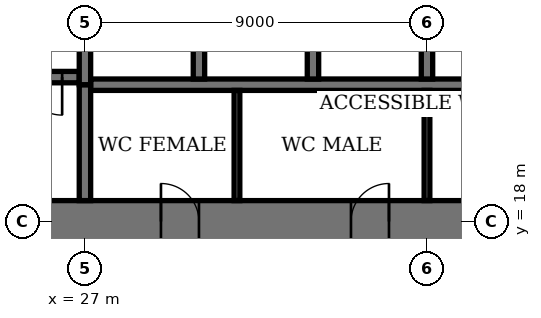
"""IFC4 building model, lengths in metres.
Left out: names, types, materials, properties, quantities, classifications, styles, units other than length and angle.
Written with IfcOpenShell. Run it as: python <this file> out.ifc"""

import sys

from ifc_helpers import new_model, si_unit, direction, frame, frame_2d, origin, place, context, subcontext, project, spatial, rectangle, extrude, element, fill, save


model = new_model("IFC4")
c1 = context("Model", 3, precision=1e-05, world=origin(), true_north=direction((0.0, 1.0)))
c2 = subcontext(c1, "Body", "Model", "MODEL_VIEW")
j1 = project(units=[si_unit("LENGTHUNIT", "METRE"), si_unit("PLANEANGLEUNIT", "RADIAN")], contexts=[c1])
p1 = place(None, origin())
s1 = spatial("IfcSite", under=j1, at=p1, CompositionType="ELEMENT")
p2 = place(p1, origin())
s2 = spatial("IfcBuilding", under=s1, at=p2, CompositionType="ELEMENT")
p3 = place(p2, frame((0.0, 0.0, 190.2)))
s3 = spatial("IfcBuildingStorey", under=s2, at=p3, CompositionType="ELEMENT", Elevation=190.2)
p4 = place(p3, frame((17.45, 18.0, 0.0), z_axis=(0.0, 0.0, 1.0), x_axis=(1.0, 0.0, 0.0)))
e1 = element("IfcWall", 1, at=p4, inside=s3, PredefinedType="SHEAR", context=c2, shape_type="SweptSolid", body=[
    extrude(rectangle(XDim=28.1, YDim=1.1, at=frame_2d((14.05, 0.0))), origin(), (0.0, 0.0, 1.0), 4.0),
])
p5 = place(p4, frame((11.55, 0.0, 0.0)))
e2 = element("IfcOpeningElement", 2, at=p5, cuts=e1, PredefinedType="OPENING", context=c2, shape_type="SweptSolid", body=[
    extrude(rectangle(XDim=1.0, YDim=2.4, at=frame_2d((0.5, 1.2))), frame((0.0, 0.56, 0.0), z_axis=(0.0, -1.0, 0.0), x_axis=(1.0, 0.0, 0.0)), (0.0, 0.0, 1.0), 1.12),
])
p6 = place(p4, frame((16.55, 0.0, 0.0)))
e3 = element("IfcOpeningElement", 3, at=p6, cuts=e1, PredefinedType="OPENING", context=c2, shape_type="SweptSolid", body=[
    extrude(rectangle(XDim=1.0, YDim=2.4, at=frame_2d((0.5, 1.2))), frame((0.0, 0.56, 0.0), z_axis=(0.0, -1.0, 0.0), x_axis=(1.0, 0.0, 0.0)), (0.0, 0.0, 1.0), 1.12),
])
p7 = place(p4, frame((20.0, 0.0, 0.0)))
e4 = element("IfcOpeningElement", 4, at=p7, cuts=e1, PredefinedType="OPENING", context=c2, shape_type="SweptSolid", body=[
    extrude(rectangle(XDim=1.1, YDim=2.4, at=frame_2d((0.55, 1.2))), frame((0.0, 0.56, 0.0), z_axis=(0.0, -1.0, 0.0), x_axis=(1.0, 0.0, 0.0)), (0.0, 0.0, 1.0), 1.12),
])
p8 = place(p4, frame((24.05, 0.0, 0.0)))
e5 = element("IfcOpeningElement", 5, at=p8, cuts=e1, PredefinedType="OPENING", context=c2, shape_type="SweptSolid", body=[
    extrude(rectangle(XDim=1.0, YDim=2.4, at=frame_2d((0.5, 1.2))), frame((0.0, 0.56, 0.0), z_axis=(0.0, -1.0, 0.0), x_axis=(1.0, 0.0, 0.0)), (0.0, 0.0, 1.0), 1.12),
])
p9 = place(p3, frame((18.55, 21.8, 0.0), z_axis=(0.0, 0.0, 1.0), x_axis=(1.0, 0.0, 0.0)))
e6 = element("IfcWall", 6, at=p9, inside=s3, PredefinedType="SHEAR", context=c2, shape_type="SweptSolid", body=[
    extrude(rectangle(XDim=8.3, YDim=0.3, at=frame_2d((4.15, 0.0))), origin(), (0.0, 0.0, 1.0), 4.0),
])
p10 = place(p9, frame((6.85, 0.0, 0.0)))
e7 = element("IfcOpeningElement", 7, at=p10, cuts=e6, PredefinedType="OPENING", context=c2, shape_type="SweptSolid", body=[
    extrude(rectangle(XDim=1.0, YDim=2.4, at=frame_2d((0.5, 1.2))), frame((0.0, 0.16, 0.0), z_axis=(0.0, -1.0, 0.0), x_axis=(1.0, 0.0, 0.0)), (0.0, 0.0, 1.0), 0.32),
])
p11 = place(p3, frame((27.0, 18.55, 0.0), z_axis=(0.0, 0.0, 1.0), x_axis=(0.0, 1.0, 0.0)))
e8 = element("IfcWall", 8, at=p11, inside=s3, PredefinedType="SHEAR", context=c2, shape_type="SweptSolid", body=[
    extrude(rectangle(XDim=3.05, YDim=0.3, at=frame_2d((1.525, 0.0))), origin(), (0.0, 0.0, 1.0), 4.0),
])
p12 = place(p3, frame((27.15, 21.6, 0.0), z_axis=(0.0, 0.0, 1.0), x_axis=(1.0, 0.0, 0.0)))
e9 = element("IfcWall", 9, at=p12, inside=s3, PredefinedType="SHEAR", context=c2, shape_type="SweptSolid", body=[
    extrude(rectangle(XDim=17.3, YDim=0.3, at=frame_2d((8.65, 0.0))), origin(), (0.0, 0.0, 1.0), 4.0),
])
for number, where, z_axis, x_axis in (
    (10, (30.0, 21.75, 0.0), (0.0, 0.0, 1.0), (0.0, 1.0, 0.0)),
    (11, (33.0, 21.75, 0.0), (0.0, 0.0, 1.0), (0.0, 1.0, 0.0)),
    (12, (36.0, 21.75, 0.0), (0.0, 0.0, 1.0), (0.0, 1.0, 0.0)),
):
    element("IfcWall", number, at=place(p3, frame(where, z_axis=z_axis, x_axis=x_axis)), inside=s3, PredefinedType="SHEAR", context=c2, shape_type="SweptSolid", body=[
        extrude(rectangle(XDim=2.7, YDim=0.3, at=frame_2d((1.35, 0.0))), origin(), (0.0, 0.0, 1.0), 4.0),
    ])
p13 = place(p3, frame((27.0, 21.6, 0.0), z_axis=(0.0, 0.0, 1.0), x_axis=(0.0, 1.0, 0.0)))
e13 = element("IfcWall", 13, at=p13, inside=s3, PredefinedType="SHEAR", context=c2, shape_type="SweptSolid", body=[
    extrude(rectangle(XDim=2.85, YDim=0.3, at=frame_2d((1.425, 0.0))), origin(), (0.0, 0.0, 1.0), 4.0),
])
for number, where, z_axis, x_axis in (
    (14, (31.0, 18.55, 0.0), (0.0, 0.0, 1.0), (0.0, 1.0, 0.0)),
    (15, (36.0, 18.55, 0.0), (0.0, 0.0, 1.0), (0.0, 1.0, 0.0)),
):
    element("IfcWall", number, at=place(p3, frame(where, z_axis=z_axis, x_axis=x_axis)), inside=s3, PredefinedType="PARTITIONING", context=c2, shape_type="SweptSolid", body=[
        extrude(rectangle(XDim=2.9, YDim=0.15, at=frame_2d((1.45, 0.0))), origin(), (0.0, 0.0, 1.0), 3.75),
    ])
p14 = place(p5, origin())
e16 = element("IfcDoor", 16, at=p14, inside=s3, OperationType="SINGLE_SWING_RIGHT", PredefinedType="DOOR", context=c2, shape_type="SweptSolid", body=[
    extrude(rectangle(XDim=1.0, YDim=2.4, at=frame_2d((0.5, 1.2))), frame((0.0, 0.025, 0.0), z_axis=(0.0, -1.0, 0.0), x_axis=(1.0, 0.0, 0.0)), (0.0, 0.0, 1.0), 0.05),
    extrude(rectangle(XDim=0.04, YDim=2.4, at=frame_2d((0.02, 1.2))), frame((0.0, 0.4, 0.0), z_axis=(0.0, -1.0, 0.0), x_axis=(1.0, 0.0, 0.0)), (0.0, 0.0, 1.0), 0.8),
    extrude(rectangle(XDim=0.04, YDim=2.4, at=frame_2d((0.98, 1.2))), frame((0.0, 0.4, 0.0), z_axis=(0.0, -1.0, 0.0), x_axis=(1.0, 0.0, 0.0)), (0.0, 0.0, 1.0), 0.8),
    extrude(rectangle(XDim=1.0, YDim=0.04, at=frame_2d((0.5, 2.38))), frame((0.0, 0.4, 0.0), z_axis=(0.0, -1.0, 0.0), x_axis=(1.0, 0.0, 0.0)), (0.0, 0.0, 1.0), 0.8),
])
fill(e2, e16)
p15 = place(p6, origin())
e17 = element("IfcDoor", 17, at=p15, inside=s3, OperationType="SINGLE_SWING_LEFT", PredefinedType="DOOR", context=c2, shape_type="SweptSolid", body=[
    extrude(rectangle(XDim=1.0, YDim=2.4, at=frame_2d((0.5, 1.2))), frame((0.0, 0.025, 0.0), z_axis=(0.0, -1.0, 0.0), x_axis=(1.0, 0.0, 0.0)), (0.0, 0.0, 1.0), 0.05),
    extrude(rectangle(XDim=0.04, YDim=2.4, at=frame_2d((0.02, 1.2))), frame((0.0, 0.4, 0.0), z_axis=(0.0, -1.0, 0.0), x_axis=(1.0, 0.0, 0.0)), (0.0, 0.0, 1.0), 0.8),
    extrude(rectangle(XDim=0.04, YDim=2.4, at=frame_2d((0.98, 1.2))), frame((0.0, 0.4, 0.0), z_axis=(0.0, -1.0, 0.0), x_axis=(1.0, 0.0, 0.0)), (0.0, 0.0, 1.0), 0.8),
    extrude(rectangle(XDim=1.0, YDim=0.04, at=frame_2d((0.5, 2.38))), frame((0.0, 0.4, 0.0), z_axis=(0.0, -1.0, 0.0), x_axis=(1.0, 0.0, 0.0)), (0.0, 0.0, 1.0), 0.8),
])
fill(e3, e17)
p16 = place(p10, origin())
e18 = element("IfcDoor", 18, at=p16, inside=s3, OperationType="SINGLE_SWING_RIGHT", PredefinedType="DOOR", context=c2, shape_type="SweptSolid", body=[
    extrude(rectangle(XDim=1.0, YDim=2.4, at=frame_2d((0.5, 1.2))), frame((0.0, 0.03, 0.0), z_axis=(0.0, -1.0, 0.0), x_axis=(1.0, 0.0, 0.0)), (0.0, 0.0, 1.0), 0.06),
])
fill(e7, e18)
save(model, sys.argv[1])
